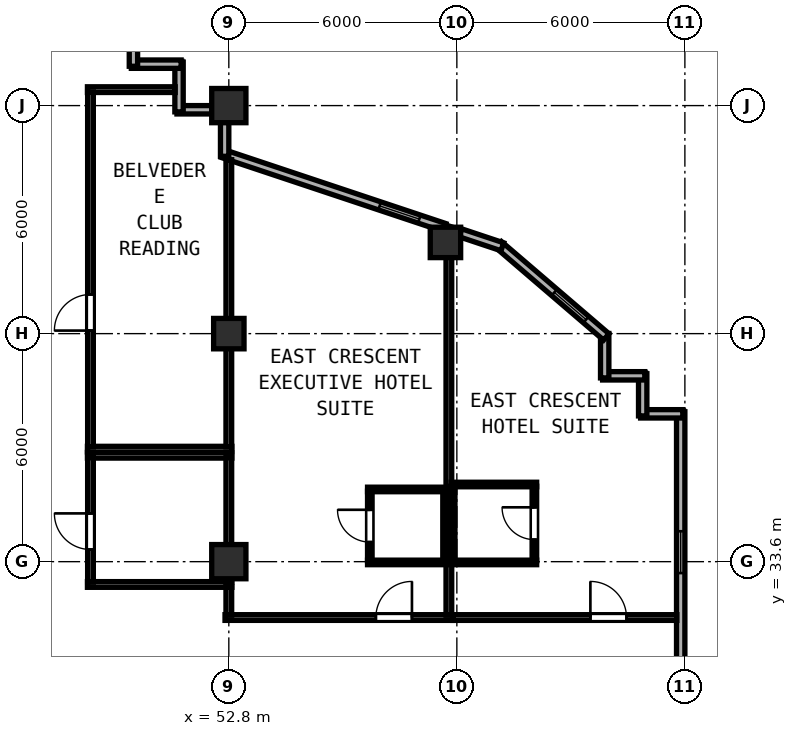
"""IFC4 building model, lengths in metres.
Left out: names, types, materials, properties, quantities, classifications, styles, units other than length and angle.
Written with IfcOpenShell. Run it as: python <this file> out.ifc"""

import sys

from ifc_helpers import new_model, si_unit, direction, frame, frame_2d, origin, origin_2d, place, context, subcontext, project, spatial, rectangle, hollow_rectangle, extrude, element, fill, save


model = new_model("IFC4")
c1 = context("Model", 3, precision=1e-05, world=origin(), true_north=direction((0.0, 1.0)))
c2 = subcontext(c1, "Body", "Model", "MODEL_VIEW")
j1 = project(units=[si_unit("LENGTHUNIT", "METRE"), si_unit("PLANEANGLEUNIT", "RADIAN")], contexts=[c1])
p1 = place(None, origin())
s1 = spatial("IfcSite", under=j1, at=p1, CompositionType="ELEMENT")
p2 = place(p1, origin())
s2 = spatial("IfcBuilding", under=s1, at=p2, CompositionType="ELEMENT")
p3 = place(p2, frame((0.0, 0.0, 169.0)))
s3 = spatial("IfcBuildingStorey", under=s2, at=p3, CompositionType="ELEMENT", Elevation=169.0)
for number, where, z_axis, x_axis in (
    (1, (52.8, 33.6, 0.0), (0.0, 0.0, 1.0), (1.0, 0.0, 0.0)),
    (2, (52.8, 45.6, 0.0), (0.0, 0.0, 1.0), (1.0, 0.0, 0.0)),
):
    element("IfcColumn", number, at=place(p3, frame(where, z_axis=z_axis, x_axis=x_axis)), inside=s3, PredefinedType="COLUMN", context=c2, shape_type="SweptSolid", body=[
        extrude(hollow_rectangle(XDim=0.9, YDim=0.9, WallThickness=0.034, at=origin_2d()), origin(), (0.0, 0.0, 1.0), 3.8),
    ])
for number, where, z_axis, x_axis in (
    (3, (52.8, 39.6, 0.0), (0.0, 0.0, 1.0), (1.0, 0.0, 0.0)),
    (4, (58.5, 42.0, 0.0), (0.0, 0.0, 1.0), (1.0, 0.0, 0.0)),
):
    element("IfcColumn", number, at=place(p3, frame(where, z_axis=z_axis, x_axis=x_axis)), inside=s3, PredefinedType="COLUMN", context=c2, shape_type="SweptSolid", body=[
        extrude(hollow_rectangle(XDim=0.8, YDim=0.8, WallThickness=0.03, at=origin_2d()), origin(), (0.0, 0.0, 1.0), 3.8),
    ])
p4 = place(p3, frame((64.69, 16.4, 0.0), z_axis=(0.0, 0.0, 1.0), x_axis=(0.0, 1.0, 0.0)))
e5 = element("IfcWall", 5, at=p4, inside=s3, PredefinedType="SOLIDWALL", context=c2, shape_type="SweptSolid", body=[
    extrude(rectangle(XDim=21.145, YDim=0.22, at=frame_2d((10.573, 0.0))), origin(), (0.0, 0.0, 1.0), 3.62),
])
p5 = place(p4, frame((1.05, 0.0, 0.85)))
e6 = element("IfcOpeningElement", 6, at=p5, cuts=e5, PredefinedType="OPENING", context=c2, shape_type="SweptSolid", body=[
    extrude(rectangle(XDim=1.1, YDim=1.75, at=frame_2d((0.55, 0.875))), frame((0.0, 0.12, 0.0), z_axis=(0.0, -1.0, 0.0), x_axis=(1.0, 0.0, 0.0)), (0.0, 0.0, 1.0), 0.24),
])
p6 = place(p4, frame((6.1, 0.0, 0.85)))
e7 = element("IfcOpeningElement", 7, at=p6, cuts=e5, PredefinedType="OPENING", context=c2, shape_type="SweptSolid", body=[
    extrude(rectangle(XDim=1.1, YDim=1.75, at=frame_2d((0.55, 0.875))), frame((0.0, 0.12, 0.0), z_axis=(0.0, -1.0, 0.0), x_axis=(1.0, 0.0, 0.0)), (0.0, 0.0, 1.0), 0.24),
])
p7 = place(p4, frame((11.85, 0.0, 0.85)))
e8 = element("IfcOpeningElement", 8, at=p7, cuts=e5, PredefinedType="OPENING", context=c2, shape_type="SweptSolid", body=[
    extrude(rectangle(XDim=1.1, YDim=1.75, at=frame_2d((0.55, 0.875))), frame((0.0, 0.12, 0.0), z_axis=(0.0, -1.0, 0.0), x_axis=(1.0, 0.0, 0.0)), (0.0, 0.0, 1.0), 0.24),
])
p8 = place(p4, frame((16.9, 0.0, 0.85)))
e9 = element("IfcOpeningElement", 9, at=p8, cuts=e5, PredefinedType="OPENING", context=c2, shape_type="SweptSolid", body=[
    extrude(rectangle(XDim=1.1, YDim=1.75, at=frame_2d((0.55, 0.875))), frame((0.0, 0.12, 0.0), z_axis=(0.0, -1.0, 0.0), x_axis=(1.0, 0.0, 0.0)), (0.0, 0.0, 1.0), 0.24),
])
p9 = place(p3, frame((64.745, 37.49, 0.0), z_axis=(0.0, 0.0, 1.0), x_axis=(-1.0, 0.0, 0.0)))
e10 = element("IfcWall", 10, at=p9, inside=s3, PredefinedType="SOLIDWALL", context=c2, shape_type="SweptSolid", body=[
    extrude(rectangle(XDim=1.11, YDim=0.22, at=frame_2d((0.555, 0.0))), origin(), (0.0, 0.0, 1.0), 3.62),
])
p10 = place(p3, frame((63.69, 37.435, 0.0), z_axis=(0.0, 0.0, 1.0), x_axis=(0.0, 1.0, 0.0)))
e11 = element("IfcWall", 11, at=p10, inside=s3, PredefinedType="SOLIDWALL", context=c2, shape_type="SweptSolid", body=[
    extrude(rectangle(XDim=1.11, YDim=0.22, at=frame_2d((0.555, 0.0))), origin(), (0.0, 0.0, 1.0), 3.62),
])
p11 = place(p3, frame((63.745, 38.49, 0.0), z_axis=(0.0, 0.0, 1.0), x_axis=(-1.0, 0.0, 0.0)))
e12 = element("IfcWall", 12, at=p11, inside=s3, PredefinedType="SOLIDWALL", context=c2, shape_type="SweptSolid", body=[
    extrude(rectangle(XDim=1.11, YDim=0.22, at=frame_2d((0.555, 0.0))), origin(), (0.0, 0.0, 1.0), 3.62),
])
p12 = place(p3, frame((62.69, 38.435, 0.0), z_axis=(0.0, 0.0, 1.0), x_axis=(0.0, 1.0, 0.0)))
e13 = element("IfcWall", 13, at=p12, inside=s3, PredefinedType="SOLIDWALL", context=c2, shape_type="SweptSolid", body=[
    extrude(rectangle(XDim=1.169, YDim=0.22, at=frame_2d((0.585, 0.0))), origin(), (0.0, 0.0, 1.0), 3.62),
])
p13 = place(p3, frame((62.732, 39.514, 0.0), z_axis=(0.0, 0.0, 1.0), x_axis=(-0.759251976569, 0.65079677018, 0.0)))
e14 = element("IfcWall", 14, at=p13, inside=s3, PredefinedType="SOLIDWALL", context=c2, shape_type="SweptSolid", body=[
    extrude(rectangle(XDim=3.726, YDim=0.22, at=frame_2d((1.863, 0.0))), origin(), (0.0, 0.0, 1.0), 3.62),
])
p14 = place(p13, frame((0.7, 0.0, 0.85)))
e15 = element("IfcOpeningElement", 15, at=p14, cuts=e14, PredefinedType="OPENING", context=c2, shape_type="SweptSolid", body=[
    extrude(rectangle(XDim=1.1, YDim=1.75, at=frame_2d((0.55, 0.875))), frame((0.0, 0.12, 0.0), z_axis=(0.0, -1.0, 0.0), x_axis=(1.0, 0.0, 0.0)), (0.0, 0.0, 1.0), 0.24),
])
p15 = place(p3, frame((59.997, 41.885, 0.0), z_axis=(0.0, 0.0, 1.0), x_axis=(-0.948662335685, 0.316290646166, 0.0)))
e16 = element("IfcWall", 16, at=p15, inside=s3, PredefinedType="SOLIDWALL", context=c2, shape_type="SweptSolid", body=[
    extrude(rectangle(XDim=1.165, YDim=0.22, at=frame_2d((0.583, 0.0))), origin(), (0.0, 0.0, 1.0), 3.62),
])
p16 = place(p3, frame((58.476, 42.392, 0.0), z_axis=(0.0, 0.0, 1.0), x_axis=(-0.948691231611, 0.316203964339, 0.0)))
e17 = element("IfcWall", 17, at=p16, inside=s3, PredefinedType="SOLIDWALL", context=c2, shape_type="SweptSolid", body=[
    extrude(rectangle(XDim=6.154, YDim=0.22, at=frame_2d((3.077, 0.0))), origin(), (0.0, 0.0, 1.0), 3.215),
])
p17 = place(p16, frame((0.7, 0.0, 0.85)))
e18 = element("IfcOpeningElement", 18, at=p17, cuts=e17, PredefinedType="OPENING", context=c2, shape_type="SweptSolid", body=[
    extrude(rectangle(XDim=1.1, YDim=1.75, at=frame_2d((0.55, 0.875))), frame((0.0, 0.12, 0.0), z_axis=(0.0, -1.0, 0.0), x_axis=(1.0, 0.0, 0.0)), (0.0, 0.0, 1.0), 0.24),
])
p18 = place(p3, frame((52.69, 44.266, 0.0), z_axis=(0.0, 0.0, 1.0), x_axis=(0.0, 1.0, 0.0)))
e19 = element("IfcWall", 19, at=p18, inside=s3, PredefinedType="SOLIDWALL", context=c2, shape_type="SweptSolid", body=[
    extrude(rectangle(XDim=0.892, YDim=0.22, at=frame_2d((0.446, 0.0))), origin(), (0.0, 0.0, 1.0), 3.215),
])
p19 = place(p3, frame((52.358, 45.49, 0.0), z_axis=(0.0, 0.0, 1.0), x_axis=(-1.0, 0.0, 0.0)))
e20 = element("IfcWall", 20, at=p19, inside=s3, PredefinedType="SOLIDWALL", context=c2, shape_type="SweptSolid", body=[
    extrude(rectangle(XDim=0.923, YDim=0.22, at=frame_2d((0.461, 0.0))), origin(), (0.0, 0.0, 1.0), 3.62),
])
p20 = place(p3, frame((51.49, 45.435, 0.0), z_axis=(0.0, 0.0, 1.0), x_axis=(0.0, 1.0, 0.0)))
e21 = element("IfcWall", 21, at=p20, inside=s3, PredefinedType="SOLIDWALL", context=c2, shape_type="SweptSolid", body=[
    extrude(rectangle(XDim=1.31, YDim=0.22, at=frame_2d((0.655, 0.0))), origin(), (0.0, 0.0, 1.0), 3.62),
])
p21 = place(p3, frame((51.545, 46.69, 0.0), z_axis=(0.0, 0.0, 1.0), x_axis=(-1.0, 0.0, 0.0)))
e22 = element("IfcWall", 22, at=p21, inside=s3, PredefinedType="SOLIDWALL", context=c2, shape_type="SweptSolid", body=[
    extrude(rectangle(XDim=1.31, YDim=0.22, at=frame_2d((0.655, 0.0))), origin(), (0.0, 0.0, 1.0), 3.62),
])
p22 = place(p3, frame((50.29, 46.635, 0.0), z_axis=(0.0, 0.0, 1.0), x_axis=(0.0, 1.0, 0.0)))
e23 = element("IfcWall", 23, at=p22, inside=s3, PredefinedType="SOLIDWALL", context=c2, shape_type="SweptSolid", body=[
    extrude(rectangle(XDim=1.535, YDim=0.22, at=frame_2d((0.768, 0.0))), origin(), (0.0, 0.0, 1.0), 3.62),
])
for number, where, z_axis, x_axis in (
    (24, (49.08, 36.4, 0.0), (0.0, 0.0, 1.0), (1.0, 0.0, 0.0)),
    (25, (49.08, 33.0, 0.0), (0.0, 0.0, 1.0), (1.0, 0.0, 0.0)),
):
    element("IfcWall", number, at=place(p3, frame(where, z_axis=z_axis, x_axis=x_axis)), inside=s3, PredefinedType="PARTITIONING", context=c2, shape_type="SweptSolid", body=[
        extrude(rectangle(XDim=3.8, YDim=0.15, at=frame_2d((1.9, 0.0))), origin(), (0.0, 0.0, 1.0), 3.62),
    ])
p23 = place(p3, frame((49.16, 33.06, 0.0), z_axis=(0.0, 0.0, 1.0), x_axis=(0.0, 1.0, 0.0)))
e26 = element("IfcWall", 26, at=p23, inside=s3, PredefinedType="PARTITIONING", context=c2, shape_type="SweptSolid", body=[
    extrude(rectangle(XDim=3.28, YDim=0.15, at=frame_2d((1.64, 0.0))), origin(), (0.0, 0.0, 1.0), 3.62),
])
p24 = place(p23, frame((0.86, 0.0, 0.0)))
e27 = element("IfcOpeningElement", 27, at=p24, cuts=e26, PredefinedType="OPENING", context=c2, shape_type="SweptSolid", body=[
    extrude(rectangle(XDim=0.95, YDim=2.12, at=frame_2d((0.475, 1.06))), frame((0.0, 0.085, 0.0), z_axis=(0.0, -1.0, 0.0), x_axis=(1.0, 0.0, 0.0)), (0.0, 0.0, 1.0), 0.17),
])
p25 = place(p3, frame((52.8, 33.06, 0.0), z_axis=(0.0, 0.0, 1.0), x_axis=(0.0, 1.0, 0.0)))
e28 = element("IfcWall", 28, at=p25, inside=s3, PredefinedType="PARTITIONING", context=c2, shape_type="SweptSolid", body=[
    extrude(rectangle(XDim=3.28, YDim=0.15, at=frame_2d((1.64, 0.0))), origin(), (0.0, 0.0, 1.0), 3.215),
])
p26 = place(p3, frame((49.08, 46.02, 0.0), z_axis=(0.0, 0.0, 1.0), x_axis=(1.0, 0.0, 0.0)))
e29 = element("IfcWall", 29, at=p26, inside=s3, PredefinedType="PARTITIONING", context=c2, shape_type="SweptSolid", body=[
    extrude(rectangle(XDim=2.308, YDim=0.15, at=frame_2d((1.154, 0.0))), origin(), (0.0, 0.0, 1.0), 3.62),
])
p27 = place(p3, frame((49.08, 36.56, 0.0), z_axis=(0.0, 0.0, 1.0), x_axis=(1.0, 0.0, 0.0)))
e30 = element("IfcWall", 30, at=p27, inside=s3, PredefinedType="PARTITIONING", context=c2, shape_type="SweptSolid", body=[
    extrude(rectangle(XDim=3.8, YDim=0.15, at=frame_2d((1.9, 0.0))), origin(), (0.0, 0.0, 1.0), 3.62),
])
p28 = place(p3, frame((49.16, 36.62, 0.0), z_axis=(0.0, 0.0, 1.0), x_axis=(0.0, 1.0, 0.0)))
e31 = element("IfcWall", 31, at=p28, inside=s3, PredefinedType="PARTITIONING", context=c2, shape_type="SweptSolid", body=[
    extrude(rectangle(XDim=9.34, YDim=0.15, at=frame_2d((4.67, 0.0))), origin(), (0.0, 0.0, 1.0), 3.62),
])
p29 = place(p28, frame((3.06, 0.0, 0.0)))
e32 = element("IfcOpeningElement", 32, at=p29, cuts=e31, PredefinedType="OPENING", context=c2, shape_type="SweptSolid", body=[
    extrude(rectangle(XDim=0.95, YDim=2.12, at=frame_2d((0.475, 1.06))), frame((0.0, 0.085, 0.0), z_axis=(0.0, -1.0, 0.0), x_axis=(1.0, 0.0, 0.0)), (0.0, 0.0, 1.0), 0.17),
])
p30 = place(p3, frame((52.8, 36.62, 0.0), z_axis=(0.0, 0.0, 1.0), x_axis=(0.0, 1.0, 0.0)))
e33 = element("IfcWall", 33, at=p30, inside=s3, PredefinedType="PARTITIONING", context=c2, shape_type="SweptSolid", body=[
    extrude(rectangle(XDim=7.556, YDim=0.15, at=frame_2d((3.778, 0.0))), origin(), (0.0, 0.0, 1.0), 3.215),
])
p31 = place(p3, frame((52.7, 32.13, 0.0), z_axis=(0.0, 0.0, 1.0), x_axis=(1.0, 0.0, 0.0)))
e34 = element("IfcWall", 34, at=p31, inside=s3, PredefinedType="PARTITIONING", context=c2, shape_type="SweptSolid", body=[
    extrude(rectangle(XDim=5.99, YDim=0.15, at=frame_2d((2.995, 0.0))), origin(), (0.0, 0.0, 1.0), 3.62),
])
p32 = place(p31, frame((3.969, 0.0, 0.0)))
e35 = element("IfcOpeningElement", 35, at=p32, cuts=e34, PredefinedType="OPENING", context=c2, shape_type="SweptSolid", body=[
    extrude(rectangle(XDim=0.95, YDim=2.18, at=frame_2d((0.475, 1.09))), frame((0.0, 0.085, 0.0), z_axis=(0.0, -1.0, 0.0), x_axis=(1.0, 0.0, 0.0)), (0.0, 0.0, 1.0), 0.17),
])
p33 = place(p3, frame((52.8, 32.19, 0.0), z_axis=(0.0, 0.0, 1.0), x_axis=(0.0, 1.0, 0.0)))
e36 = element("IfcWall", 36, at=p33, inside=s3, PredefinedType="PARTITIONING", context=c2, shape_type="SweptSolid", body=[
    extrude(rectangle(XDim=0.75, YDim=0.15, at=frame_2d((0.375, 0.0))), origin(), (0.0, 0.0, 1.0), 3.215),
])
p34 = place(p3, frame((58.59, 32.19, 0.0), z_axis=(0.0, 0.0, 1.0), x_axis=(0.0, 1.0, 0.0)))
e37 = element("IfcWall", 37, at=p34, inside=s3, PredefinedType="PARTITIONING", context=c2, shape_type="SweptSolid", body=[
    extrude(rectangle(XDim=10.057, YDim=0.15, at=frame_2d((5.028, 0.0))), origin(), (0.0, 0.0, 1.0), 3.62),
])
for number, where, z_axis, x_axis in (
    (38, (56.45, 35.5, 0.0), (0.0, 0.0, 1.0), (1.0, 0.0, 0.0)),
    (39, (56.45, 33.58, 0.0), (0.0, 0.0, 1.0), (1.0, 0.0, 0.0)),
):
    element("IfcWall", number, at=place(p3, frame(where, z_axis=z_axis, x_axis=x_axis)), inside=s3, PredefinedType="PARTITIONING", context=c2, shape_type="SweptSolid", body=[
        extrude(rectangle(XDim=2.08, YDim=0.12, at=frame_2d((1.04, 0.0))), origin(), (0.0, 0.0, 1.0), 3.62),
    ])
p35 = place(p3, frame((56.51, 33.625, 0.0), z_axis=(0.0, 0.0, 1.0), x_axis=(0.0, 1.0, 0.0)))
e40 = element("IfcWall", 40, at=p35, inside=s3, PredefinedType="PARTITIONING", context=c2, shape_type="SweptSolid", body=[
    extrude(rectangle(XDim=1.83, YDim=0.12, at=frame_2d((0.915, 0.0))), origin(), (0.0, 0.0, 1.0), 3.62),
])
p36 = place(p35, frame((1.34, 0.0, 0.0), z_axis=(0.0, 0.0, 1.0), x_axis=(-1.0, 0.0, 0.0)))
e41 = element("IfcOpeningElement", 41, at=p36, cuts=e40, PredefinedType="OPENING", context=c2, shape_type="SweptSolid", body=[
    extrude(rectangle(XDim=0.85, YDim=2.1, at=frame_2d((0.425, 1.05))), frame((0.0, 0.07, 0.0), z_axis=(0.0, -1.0, 0.0), x_axis=(1.0, 0.0, 0.0)), (0.0, 0.0, 1.0), 0.14),
])
p37 = place(p3, frame((58.49, 33.625, 0.0), z_axis=(0.0, 0.0, 1.0), x_axis=(0.0, 1.0, 0.0)))
e42 = element("IfcWall", 42, at=p37, inside=s3, PredefinedType="PARTITIONING", context=c2, shape_type="SweptSolid", body=[
    extrude(rectangle(XDim=1.83, YDim=0.12, at=frame_2d((0.915, 0.0))), origin(), (0.0, 0.0, 1.0), 3.62),
])
p38 = place(p3, frame((58.692, 32.13, 0.0), z_axis=(0.0, 0.0, 1.0), x_axis=(1.0, 0.0, 0.0)))
e43 = element("IfcWall", 43, at=p38, inside=s3, PredefinedType="PARTITIONING", context=c2, shape_type="SweptSolid", body=[
    extrude(rectangle(XDim=5.896, YDim=0.15, at=frame_2d((2.948, 0.0))), origin(), (0.0, 0.0, 1.0), 3.62),
])
p39 = place(p38, frame((3.622, 0.0, 0.0)))
e44 = element("IfcOpeningElement", 44, at=p39, cuts=e43, PredefinedType="OPENING", context=c2, shape_type="SweptSolid", body=[
    extrude(rectangle(XDim=0.95, YDim=2.18, at=frame_2d((0.475, 1.09))), frame((0.0, 0.085, 0.0), z_axis=(0.0, -1.0, 0.0), x_axis=(1.0, 0.0, 0.0)), (0.0, 0.0, 1.0), 0.17),
])
for number, where, z_axis, x_axis in (
    (45, (58.65, 35.63, 0.0), (0.0, 0.0, 1.0), (1.0, 0.0, 0.0)),
    (46, (58.65, 33.58, 0.0), (0.0, 0.0, 1.0), (1.0, 0.0, 0.0)),
):
    element("IfcWall", number, at=place(p3, frame(where, z_axis=z_axis, x_axis=x_axis)), inside=s3, PredefinedType="PARTITIONING", context=c2, shape_type="SweptSolid", body=[
        extrude(rectangle(XDim=2.25, YDim=0.12, at=frame_2d((1.125, 0.0))), origin(), (0.0, 0.0, 1.0), 3.62),
    ])
p40 = place(p3, frame((58.69, 33.625, 0.0), z_axis=(0.0, 0.0, 1.0), x_axis=(0.0, 1.0, 0.0)))
e47 = element("IfcWall", 47, at=p40, inside=s3, PredefinedType="PARTITIONING", context=c2, shape_type="SweptSolid", body=[
    extrude(rectangle(XDim=1.96, YDim=0.12, at=frame_2d((0.98, 0.0))), origin(), (0.0, 0.0, 1.0), 3.62),
])
p41 = place(p3, frame((60.84, 33.625, 0.0), z_axis=(0.0, 0.0, 1.0), x_axis=(0.0, 1.0, 0.0)))
e48 = element("IfcWall", 48, at=p41, inside=s3, PredefinedType="PARTITIONING", context=c2, shape_type="SweptSolid", body=[
    extrude(rectangle(XDim=1.96, YDim=0.12, at=frame_2d((0.98, 0.0))), origin(), (0.0, 0.0, 1.0), 3.62),
])
p42 = place(p41, frame((0.555, 0.0, 0.0)))
e49 = element("IfcOpeningElement", 49, at=p42, cuts=e48, PredefinedType="OPENING", context=c2, shape_type="SweptSolid", body=[
    extrude(rectangle(XDim=0.85, YDim=2.1, at=frame_2d((0.425, 1.05))), frame((0.0, 0.07, 0.0), z_axis=(0.0, -1.0, 0.0), x_axis=(1.0, 0.0, 0.0)), (0.0, 0.0, 1.0), 0.14),
])
p43 = place(p8, origin())
e50 = element("IfcWindow", 50, at=p43, inside=s3, PartitioningType="SINGLE_PANEL", PredefinedType="WINDOW", context=c2, shape_type="SweptSolid", body=[
    extrude(rectangle(XDim=1.1, YDim=1.75, at=frame_2d((0.55, 0.875))), frame((0.0, 0.03, 0.0), z_axis=(0.0, -1.0, 0.0), x_axis=(1.0, 0.0, 0.0)), (0.0, 0.0, 1.0), 0.06),
])
fill(e9, e50)
p44 = place(p14, origin())
e51 = element("IfcWindow", 51, at=p44, inside=s3, PartitioningType="SINGLE_PANEL", PredefinedType="WINDOW", context=c2, shape_type="SweptSolid", body=[
    extrude(rectangle(XDim=1.1, YDim=1.75, at=frame_2d((0.55, 0.875))), frame((0.0, 0.03, 0.0), z_axis=(0.0, -1.0, 0.0), x_axis=(1.0, 0.0, 0.0)), (0.0, 0.0, 1.0), 0.06),
])
fill(e15, e51)
p45 = place(p17, origin())
e52 = element("IfcWindow", 52, at=p45, inside=s3, PartitioningType="SINGLE_PANEL", PredefinedType="WINDOW", context=c2, shape_type="SweptSolid", body=[
    extrude(rectangle(XDim=1.1, YDim=1.75, at=frame_2d((0.55, 0.875))), frame((0.0, 0.03, 0.0), z_axis=(0.0, -1.0, 0.0), x_axis=(1.0, 0.0, 0.0)), (0.0, 0.0, 1.0), 0.06),
])
fill(e18, e52)
p46 = place(p24, origin())
e53 = element("IfcDoor", 53, at=p46, inside=s3, OperationType="SINGLE_SWING_RIGHT", PredefinedType="DOOR", context=c2, shape_type="SweptSolid", body=[
    extrude(rectangle(XDim=0.95, YDim=2.12, at=frame_2d((0.475, 1.06))), frame((0.0, 0.025, 0.0), z_axis=(0.0, -1.0, 0.0), x_axis=(1.0, 0.0, 0.0)), (0.0, 0.0, 1.0), 0.05),
])
fill(e27, e53)
p47 = place(p29, origin())
e54 = element("IfcDoor", 54, at=p47, inside=s3, OperationType="SINGLE_SWING_LEFT", PredefinedType="DOOR", context=c2, shape_type="SweptSolid", body=[
    extrude(rectangle(XDim=0.95, YDim=2.12, at=frame_2d((0.475, 1.06))), frame((0.0, 0.025, 0.0), z_axis=(0.0, -1.0, 0.0), x_axis=(1.0, 0.0, 0.0)), (0.0, 0.0, 1.0), 0.05),
])
fill(e32, e54)
p48 = place(p32, origin())
e55 = element("IfcDoor", 55, at=p48, inside=s3, OperationType="SINGLE_SWING_RIGHT", PredefinedType="DOOR", context=c2, shape_type="SweptSolid", body=[
    extrude(rectangle(XDim=0.95, YDim=2.18, at=frame_2d((0.475, 1.09))), frame((0.0, 0.025, 0.0), z_axis=(0.0, -1.0, 0.0), x_axis=(1.0, 0.0, 0.0)), (0.0, 0.0, 1.0), 0.05),
])
fill(e35, e55)
p49 = place(p36, origin())
e56 = element("IfcDoor", 56, at=p49, inside=s3, OperationType="SINGLE_SWING_LEFT", PredefinedType="DOOR", context=c2, shape_type="SweptSolid", body=[
    extrude(rectangle(XDim=0.85, YDim=2.1, at=frame_2d((0.425, 1.05))), frame((0.0, 0.025, 0.0), z_axis=(0.0, -1.0, 0.0), x_axis=(1.0, 0.0, 0.0)), (0.0, 0.0, 1.0), 0.05),
])
fill(e41, e56)
p50 = place(p39, origin())
e57 = element("IfcDoor", 57, at=p50, inside=s3, OperationType="SINGLE_SWING_LEFT", PredefinedType="DOOR", context=c2, shape_type="SweptSolid", body=[
    extrude(rectangle(XDim=0.95, YDim=2.18, at=frame_2d((0.475, 1.09))), frame((0.0, 0.025, 0.0), z_axis=(0.0, -1.0, 0.0), x_axis=(1.0, 0.0, 0.0)), (0.0, 0.0, 1.0), 0.05),
])
fill(e44, e57)
p51 = place(p42, origin())
e58 = element("IfcDoor", 58, at=p51, inside=s3, OperationType="SINGLE_SWING_RIGHT", PredefinedType="DOOR", context=c2, shape_type="SweptSolid", body=[
    extrude(rectangle(XDim=0.85, YDim=2.1, at=frame_2d((0.425, 1.05))), frame((0.0, 0.025, 0.0), z_axis=(0.0, -1.0, 0.0), x_axis=(1.0, 0.0, 0.0)), (0.0, 0.0, 1.0), 0.05),
])
fill(e49, e58)
save(model, sys.argv[1])
